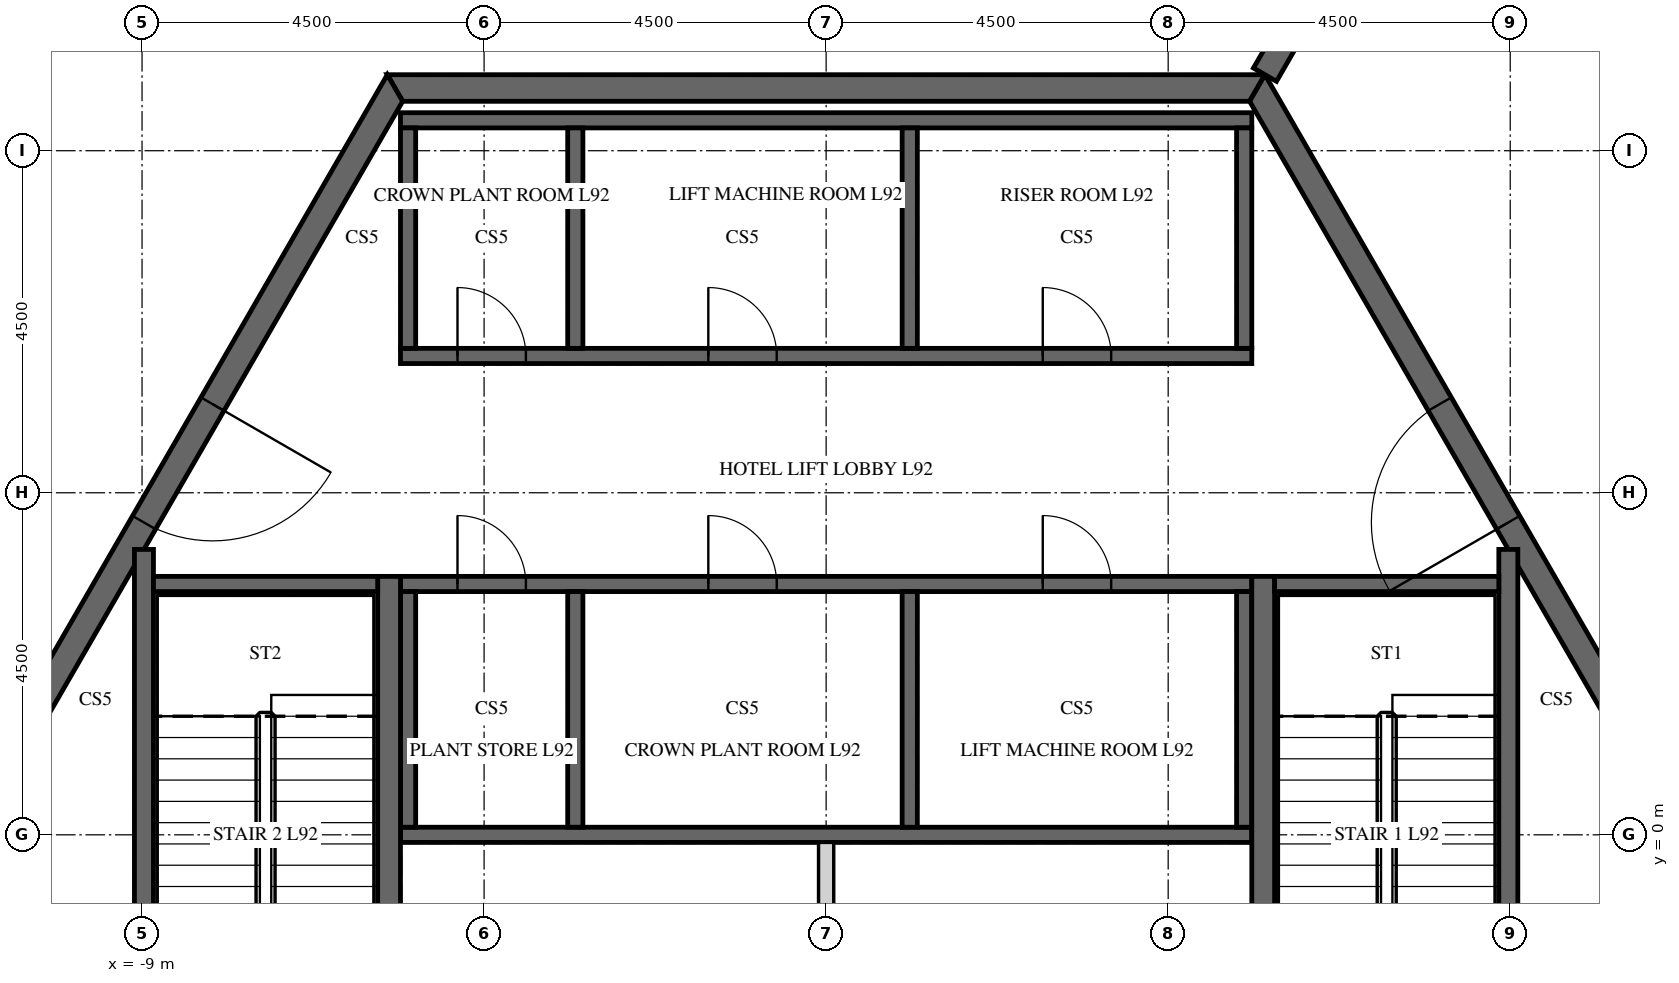
"""IFC4 building model, lengths in metres.
Left out: names, types, materials, properties, quantities, classifications, styles, units other than length and angle.
Written with IfcOpenShell. Run it as: python <this file> out.ifc"""

import sys

from ifc_helpers import new_model, si_unit, direction, frame, frame_2d, origin, place, context, subcontext, project, spatial, polyline, rectangle, outline, extrude, element, fill, save


model = new_model("IFC4")
c1 = context("Model", 3, precision=1e-05, world=origin(), true_north=direction((0.0, 1.0)))
c2 = subcontext(c1, "Body", "Model", "MODEL_VIEW")
j1 = project(units=[si_unit("LENGTHUNIT", "METRE"), si_unit("PLANEANGLEUNIT", "RADIAN")], contexts=[c1])
p1 = place(None, origin())
s1 = spatial("IfcSite", under=j1, at=p1, CompositionType="ELEMENT")
p2 = place(p1, origin())
s2 = spatial("IfcBuilding", under=s1, at=p2, CompositionType="ELEMENT")
p3 = place(p2, frame((0.0, 0.0, 388.2)))
s3 = spatial("IfcBuildingStorey", under=s2, at=p3, CompositionType="ELEMENT", Elevation=388.2)
p4 = place(p3, frame((-5.673, 9.825, -0.2), z_axis=(0.0, 0.0, 1.0), x_axis=(-0.499995046907, -0.866028263435, 0.0)))
e1 = element("IfcWall", 1, at=p4, inside=s3, PredefinedType="SHEAR", context=c2, shape_type="SweptSolid", body=[
    extrude(outline(polyline([(-0.101, -0.175), (11.446, -0.175), (11.244, 0.175), (0.101, 0.175), (-0.101, -0.175)])), origin(), (0.0, 0.0, 1.0), 4.5),
])
p5 = place(p4, frame((4.801, 0.0, 0.2)))
e2 = element("IfcOpeningElement", 2, at=p5, cuts=e1, PredefinedType="OPENING", context=c2, shape_type="SweptSolid", body=[
    extrude(rectangle(XDim=1.8, YDim=2.4, at=frame_2d((0.9, 1.2))), frame((0.0, 0.185, 0.0), z_axis=(0.0, -1.0, 0.0), x_axis=(1.0, 0.0, 0.0)), (0.0, 0.0, 1.0), 0.37),
])
p6 = place(p3, frame((-11.345, 0.0, -0.2), z_axis=(0.0, 0.0, 1.0), x_axis=(0.499995046907, -0.866028263435, 0.0)))
e3 = element("IfcWall", 3, at=p6, inside=s3, PredefinedType="SHEAR", context=c2, shape_type="SweptSolid", body=[
    extrude(outline(polyline([(-0.101, -0.175), (11.446, -0.175), (11.244, 0.175), (0.101, 0.175), (-0.101, -0.175)])), origin(), (0.0, 0.0, 1.0), 4.5),
])
p7 = place(p6, frame((4.744, 0.0, 0.2)))
e4 = element("IfcOpeningElement", 4, at=p7, cuts=e3, PredefinedType="OPENING", context=c2, shape_type="SweptSolid", body=[
    extrude(rectangle(XDim=1.8, YDim=2.4, at=frame_2d((0.9, 1.2))), frame((0.0, 0.185, 0.0), z_axis=(0.0, -1.0, 0.0), x_axis=(1.0, 0.0, 0.0)), (0.0, 0.0, 1.0), 0.37),
])
p8 = place(p3, frame((5.673, -9.825, -0.2), z_axis=(0.0, 0.0, 1.0), x_axis=(0.499995046907, 0.866028263435, 0.0)))
e5 = element("IfcWall", 5, at=p8, inside=s3, PredefinedType="SHEAR", context=c2, shape_type="SweptSolid", body=[
    extrude(outline(polyline([(-0.101, -0.175), (11.446, -0.175), (11.244, 0.175), (0.101, 0.175), (-0.101, -0.175)])), origin(), (0.0, 0.0, 1.0), 4.5),
])
p9 = place(p8, frame((4.801, 0.0, 0.2)))
e6 = element("IfcOpeningElement", 6, at=p9, cuts=e5, PredefinedType="OPENING", context=c2, shape_type="SweptSolid", body=[
    extrude(rectangle(XDim=1.8, YDim=2.4, at=frame_2d((0.9, 1.2))), frame((0.0, 0.185, 0.0), z_axis=(0.0, -1.0, 0.0), x_axis=(1.0, 0.0, 0.0)), (0.0, 0.0, 1.0), 0.37),
])
p10 = place(p3, frame((11.345, 0.0, -0.2), z_axis=(0.0, 0.0, 1.0), x_axis=(-0.499995046907, 0.866028263435, 0.0)))
e7 = element("IfcWall", 7, at=p10, inside=s3, PredefinedType="SHEAR", context=c2, shape_type="SweptSolid", body=[
    extrude(outline(polyline([(-0.101, -0.175), (11.446, -0.175), (11.244, 0.175), (0.101, 0.175), (-0.101, -0.175)])), origin(), (0.0, 0.0, 1.0), 4.5),
])
p11 = place(p10, frame((4.744, 0.0, 0.2)))
e8 = element("IfcOpeningElement", 8, at=p11, cuts=e7, PredefinedType="OPENING", context=c2, shape_type="SweptSolid", body=[
    extrude(rectangle(XDim=1.8, YDim=2.4, at=frame_2d((0.9, 1.2))), frame((0.0, 0.185, 0.0), z_axis=(0.0, -1.0, 0.0), x_axis=(1.0, 0.0, 0.0)), (0.0, 0.0, 1.0), 0.37),
])
p12 = place(p3, frame((5.673, 9.825, -0.2), z_axis=(0.0, 0.0, 1.0), x_axis=(-1.0, 0.0, 0.0)))
e9 = element("IfcWall", 9, at=p12, inside=s3, PredefinedType="SHEAR", context=c2, shape_type="SweptSolid", body=[
    extrude(outline(polyline([(-0.101, -0.175), (11.446, -0.175), (11.244, 0.175), (0.101, 0.175), (-0.101, -0.175)])), origin(), (0.0, 0.0, 1.0), 4.5),
])
p13 = place(p3, frame((5.773, 10.0, -0.2), z_axis=(0.0, 0.0, 1.0), x_axis=(0.50001273609, 0.866018050475, 0.0)))
e10 = element("IfcWall", 10, at=p13, inside=s3, PredefinedType="SHEAR", context=c2, shape_type="SweptSolid", body=[
    extrude(rectangle(XDim=12.425, YDim=0.35, at=frame_2d((6.212, 0.0))), origin(), (0.0, 0.0, 1.0), 4.5),
])
p14 = place(p13, frame((5.312, 0.0, 0.2)))
e11 = element("IfcOpeningElement", 11, at=p14, cuts=e10, PredefinedType="OPENING", context=c2, shape_type="SweptSolid", body=[
    extrude(rectangle(XDim=1.8, YDim=2.4, at=frame_2d((0.9, 1.2))), frame((0.0, 0.185, 0.0), z_axis=(0.0, -1.0, 0.0), x_axis=(1.0, 0.0, 0.0)), (0.0, 0.0, 1.0), 0.37),
])
p15 = place(p3, frame((-5.6, 6.3, -0.2), z_axis=(0.0, 0.0, 1.0), x_axis=(1.0, 0.0, 0.0)))
e12 = element("IfcWall", 12, at=p15, inside=s3, PredefinedType="SHEAR", context=c2, shape_type="SweptSolid", body=[
    extrude(rectangle(XDim=11.2, YDim=0.2, at=frame_2d((5.6, 0.0))), origin(), (0.0, 0.0, 1.0), 4.5),
])
p16 = place(p15, frame((0.75, 0.0, 0.2)))
e13 = element("IfcOpeningElement", 13, at=p16, cuts=e12, PredefinedType="OPENING", context=c2, shape_type="SweptSolid", body=[
    extrude(rectangle(XDim=0.9, YDim=2.1, at=frame_2d((0.45, 1.05))), frame((0.0, 0.11, 0.0), z_axis=(0.0, -1.0, 0.0), x_axis=(1.0, 0.0, 0.0)), (0.0, 0.0, 1.0), 0.22),
])
p17 = place(p15, frame((4.05, 0.0, 0.2)))
e14 = element("IfcOpeningElement", 14, at=p17, cuts=e12, PredefinedType="OPENING", context=c2, shape_type="SweptSolid", body=[
    extrude(rectangle(XDim=0.9, YDim=2.1, at=frame_2d((0.45, 1.05))), frame((0.0, 0.11, 0.0), z_axis=(0.0, -1.0, 0.0), x_axis=(1.0, 0.0, 0.0)), (0.0, 0.0, 1.0), 0.22),
])
p18 = place(p15, frame((8.45, 0.0, 0.2)))
e15 = element("IfcOpeningElement", 15, at=p18, cuts=e12, PredefinedType="OPENING", context=c2, shape_type="SweptSolid", body=[
    extrude(rectangle(XDim=0.9, YDim=2.1, at=frame_2d((0.45, 1.05))), frame((0.0, 0.11, 0.0), z_axis=(0.0, -1.0, 0.0), x_axis=(1.0, 0.0, 0.0)), (0.0, 0.0, 1.0), 0.22),
])
p19 = place(p3, frame((-5.6, 9.4, -0.2), z_axis=(0.0, 0.0, 1.0), x_axis=(1.0, 0.0, 0.0)))
e16 = element("IfcWall", 16, at=p19, inside=s3, PredefinedType="SHEAR", context=c2, shape_type="SweptSolid", body=[
    extrude(rectangle(XDim=11.2, YDim=0.2, at=frame_2d((5.6, 0.0))), origin(), (0.0, 0.0, 1.0), 4.5),
])
for number, where, z_axis, x_axis in (
    (17, (-5.5, 6.4, -0.2), (0.0, 0.0, 1.0), (0.0, 1.0, 0.0)),
    (18, (-3.3, 6.4, -0.2), (0.0, 0.0, 1.0), (0.0, 1.0, 0.0)),
    (19, (1.1, 6.4, -0.2), (0.0, 0.0, 1.0), (0.0, 1.0, 0.0)),
    (20, (5.5, 6.4, -0.2), (0.0, 0.0, 1.0), (0.0, 1.0, 0.0)),
):
    element("IfcWall", number, at=place(p3, frame(where, z_axis=z_axis, x_axis=x_axis)), inside=s3, PredefinedType="SHEAR", context=c2, shape_type="SweptSolid", body=[
        extrude(rectangle(XDim=2.9, YDim=0.2, at=frame_2d((1.45, 0.0))), origin(), (0.0, 0.0, 1.0), 4.5),
    ])
p20 = place(p3, frame((-5.6, 3.3, -0.2), z_axis=(0.0, 0.0, 1.0), x_axis=(1.0, 0.0, 0.0)))
e21 = element("IfcWall", 21, at=p20, inside=s3, PredefinedType="SHEAR", context=c2, shape_type="SweptSolid", body=[
    extrude(rectangle(XDim=11.2, YDim=0.2, at=frame_2d((5.6, 0.0))), origin(), (0.0, 0.0, 1.0), 4.5),
])
p21 = place(p20, frame((0.75, 0.0, 0.2)))
e22 = element("IfcOpeningElement", 22, at=p21, cuts=e21, PredefinedType="OPENING", context=c2, shape_type="SweptSolid", body=[
    extrude(rectangle(XDim=0.9, YDim=2.1, at=frame_2d((0.45, 1.05))), frame((0.0, 0.11, 0.0), z_axis=(0.0, -1.0, 0.0), x_axis=(1.0, 0.0, 0.0)), (0.0, 0.0, 1.0), 0.22),
])
p22 = place(p20, frame((4.05, 0.0, 0.2)))
e23 = element("IfcOpeningElement", 23, at=p22, cuts=e21, PredefinedType="OPENING", context=c2, shape_type="SweptSolid", body=[
    extrude(rectangle(XDim=0.9, YDim=2.1, at=frame_2d((0.45, 1.05))), frame((0.0, 0.11, 0.0), z_axis=(0.0, -1.0, 0.0), x_axis=(1.0, 0.0, 0.0)), (0.0, 0.0, 1.0), 0.22),
])
p23 = place(p20, frame((8.45, 0.0, 0.2)))
e24 = element("IfcOpeningElement", 24, at=p23, cuts=e21, PredefinedType="OPENING", context=c2, shape_type="SweptSolid", body=[
    extrude(rectangle(XDim=0.9, YDim=2.1, at=frame_2d((0.45, 1.05))), frame((0.0, 0.11, 0.0), z_axis=(0.0, -1.0, 0.0), x_axis=(1.0, 0.0, 0.0)), (0.0, 0.0, 1.0), 0.22),
])
p24 = place(p3, frame((-5.6, 0.0, -0.2), z_axis=(0.0, 0.0, 1.0), x_axis=(1.0, 0.0, 0.0)))
e25 = element("IfcWall", 25, at=p24, inside=s3, PredefinedType="SHEAR", context=c2, shape_type="SweptSolid", body=[
    extrude(rectangle(XDim=11.2, YDim=0.2, at=frame_2d((5.6, 0.0))), origin(), (0.0, 0.0, 1.0), 4.5),
])
for number, where, z_axis, x_axis in (
    (26, (-5.5, 0.1, -0.2), (0.0, 0.0, 1.0), (0.0, 1.0, 0.0)),
    (27, (-3.3, 0.1, -0.2), (0.0, 0.0, 1.0), (0.0, 1.0, 0.0)),
    (28, (1.1, 0.1, -0.2), (0.0, 0.0, 1.0), (0.0, 1.0, 0.0)),
    (29, (5.5, 0.1, -0.2), (0.0, 0.0, 1.0), (0.0, 1.0, 0.0)),
):
    element("IfcWall", number, at=place(p3, frame(where, z_axis=z_axis, x_axis=x_axis)), inside=s3, PredefinedType="SHEAR", context=c2, shape_type="SweptSolid", body=[
        extrude(rectangle(XDim=3.1, YDim=0.2, at=frame_2d((1.55, 0.0))), origin(), (0.0, 0.0, 1.0), 4.5),
    ])
p25 = place(p3, frame((0.0, -6.2, 0.0), z_axis=(0.0, 0.0, 1.0), x_axis=(0.0, 1.0, 0.0)))
e30 = element("IfcWall", 30, at=p25, inside=s3, PredefinedType="PARTITIONING", context=c2, shape_type="SweptSolid", body=[
    extrude(rectangle(XDim=6.1, YDim=0.2, at=frame_2d((3.05, 0.0))), origin(), (0.0, 0.0, 1.0), 4.3),
])
p26 = place(p3, frame((5.75, -3.4, -0.2), z_axis=(0.0, 0.0, 1.0), x_axis=(0.0, 1.0, 0.0)))
e31 = element("IfcWall", 31, at=p26, inside=s3, PredefinedType="SHEAR", context=c2, shape_type="SweptSolid", body=[
    extrude(rectangle(XDim=6.8, YDim=0.3, at=frame_2d((3.4, 0.0))), origin(), (0.0, 0.0, 1.0), 4.5),
])
p27 = place(p3, frame((8.975, -3.755, -0.2), z_axis=(0.0, 0.0, 1.0), x_axis=(0.0, 1.0, 0.0)))
e32 = element("IfcWall", 32, at=p27, inside=s3, PredefinedType="SHEAR", context=c2, shape_type="SweptSolid", body=[
    extrude(rectangle(XDim=7.51, YDim=0.25, at=frame_2d((3.755, 0.0))), origin(), (0.0, 0.0, 1.0), 4.5),
])
p28 = place(p3, frame((5.9, 3.3, -0.2), z_axis=(0.0, 0.0, 1.0), x_axis=(1.0, 0.0, 0.0)))
e33 = element("IfcWall", 33, at=p28, inside=s3, PredefinedType="SHEAR", context=c2, shape_type="SweptSolid", body=[
    extrude(rectangle(XDim=2.95, YDim=0.2, at=frame_2d((1.475, 0.0))), origin(), (0.0, 0.0, 1.0), 4.5),
])
p29 = place(p3, frame((-5.75, -3.4, -0.2), z_axis=(0.0, 0.0, 1.0), x_axis=(0.0, 1.0, 0.0)))
e34 = element("IfcWall", 34, at=p29, inside=s3, PredefinedType="SHEAR", context=c2, shape_type="SweptSolid", body=[
    extrude(rectangle(XDim=6.8, YDim=0.3, at=frame_2d((3.4, 0.0))), origin(), (0.0, 0.0, 1.0), 4.5),
])
p30 = place(p3, frame((-8.975, -3.755, -0.2), z_axis=(0.0, 0.0, 1.0), x_axis=(0.0, 1.0, 0.0)))
e35 = element("IfcWall", 35, at=p30, inside=s3, PredefinedType="SHEAR", context=c2, shape_type="SweptSolid", body=[
    extrude(rectangle(XDim=7.51, YDim=0.25, at=frame_2d((3.755, 0.0))), origin(), (0.0, 0.0, 1.0), 4.5),
])
p31 = place(p3, frame((-8.85, 3.3, -0.2), z_axis=(0.0, 0.0, 1.0), x_axis=(1.0, 0.0, 0.0)))
e36 = element("IfcWall", 36, at=p31, inside=s3, PredefinedType="SHEAR", context=c2, shape_type="SweptSolid", body=[
    extrude(rectangle(XDim=2.95, YDim=0.2, at=frame_2d((1.475, 0.0))), origin(), (0.0, 0.0, 1.0), 4.5),
])
p32 = place(p3, frame((-18.79, -0.175, 0.0), z_axis=(0.0, 0.0, 1.0), x_axis=(0.500020978615, -0.866013291437, 0.0)))
e37 = element("IfcWall", 37, at=p32, inside=s3, PredefinedType="PARTITIONING", context=c2, shape_type="SweptSolid", body=[
    extrude(rectangle(XDim=18.689, YDim=0.2, at=frame_2d((9.345, 0.0))), origin(), (0.0, 0.0, 1.0), 3.692),
])
p33 = place(p32, frame((8.745, 0.0, 0.0)))
e38 = element("IfcOpeningElement", 38, at=p33, cuts=e37, PredefinedType="OPENING", context=c2, shape_type="SweptSolid", body=[
    extrude(rectangle(XDim=1.2, YDim=2.1, at=frame_2d((0.6, 1.05))), frame((0.0, 0.11, 0.0), z_axis=(0.0, -1.0, 0.0), x_axis=(1.0, 0.0, 0.0)), (0.0, 0.0, 1.0), 0.22),
])
p34 = place(p3, frame((-9.445, 16.36, 0.0), z_axis=(0.0, 0.0, 1.0), x_axis=(-0.500020978615, -0.866013291437, 0.0)))
e39 = element("IfcWall", 39, at=p34, inside=s3, PredefinedType="PARTITIONING", context=c2, shape_type="SweptSolid", body=[
    extrude(rectangle(XDim=18.689, YDim=0.2, at=frame_2d((9.345, 0.0))), origin(), (0.0, 0.0, 1.0), 3.692),
])
p35 = place(p34, frame((8.745, 0.0, 0.0)))
e40 = element("IfcOpeningElement", 40, at=p35, cuts=e39, PredefinedType="OPENING", context=c2, shape_type="SweptSolid", body=[
    extrude(rectangle(XDim=1.2, YDim=2.1, at=frame_2d((0.6, 1.05))), frame((0.0, 0.11, 0.0), z_axis=(0.0, -1.0, 0.0), x_axis=(1.0, 0.0, 0.0)), (0.0, 0.0, 1.0), 0.22),
])
p36 = place(p3, frame((9.546, -16.185, 0.0), z_axis=(0.0, 0.0, 1.0), x_axis=(0.500030775662, 0.866007634718, 0.0)))
e41 = element("IfcWall", 41, at=p36, inside=s3, PredefinedType="PARTITIONING", context=c2, shape_type="SweptSolid", body=[
    extrude(rectangle(XDim=18.689, YDim=0.2, at=frame_2d((9.345, 0.0))), origin(), (0.0, 0.0, 1.0), 3.692),
])
p37 = place(p36, frame((8.745, 0.0, 0.0)))
e42 = element("IfcOpeningElement", 42, at=p37, cuts=e41, PredefinedType="OPENING", context=c2, shape_type="SweptSolid", body=[
    extrude(rectangle(XDim=1.2, YDim=2.1, at=frame_2d((0.6, 1.05))), frame((0.0, 0.11, 0.0), z_axis=(0.0, -1.0, 0.0), x_axis=(1.0, 0.0, 0.0)), (0.0, 0.0, 1.0), 0.22),
])
p38 = place(p3, frame((18.833, 0.1, 0.0), z_axis=(0.0, 0.0, 1.0), x_axis=(-0.500028143963, 0.86600915425, 0.0)))
e43 = element("IfcWall", 43, at=p38, inside=s3, PredefinedType="PARTITIONING", context=c2, shape_type="SweptSolid", body=[
    extrude(rectangle(XDim=18.574, YDim=0.2, at=frame_2d((9.287, 0.0))), origin(), (0.0, 0.0, 1.0), 3.692),
])
p39 = place(p5, origin())
e44 = element("IfcDoor", 44, at=p39, inside=s3, OperationType="DOUBLE_DOOR_SINGLE_SWING", PredefinedType="DOOR", context=c2, shape_type="SweptSolid", body=[
    extrude(rectangle(XDim=1.8, YDim=2.4, at=frame_2d((0.9, 1.2))), frame((0.0, 0.025, 0.0), z_axis=(0.0, -1.0, 0.0), x_axis=(1.0, 0.0, 0.0)), (0.0, 0.0, 1.0), 0.05),
])
fill(e2, e44)
p40 = place(p11, origin())
e45 = element("IfcDoor", 45, at=p40, inside=s3, OperationType="DOUBLE_DOOR_SINGLE_SWING", PredefinedType="DOOR", context=c2, shape_type="SweptSolid", body=[
    extrude(rectangle(XDim=1.8, YDim=2.4, at=frame_2d((0.9, 1.2))), frame((0.0, 0.025, 0.0), z_axis=(0.0, -1.0, 0.0), x_axis=(1.0, 0.0, 0.0)), (0.0, 0.0, 1.0), 0.05),
])
fill(e8, e45)
p41 = place(p16, origin())
e46 = element("IfcDoor", 46, at=p41, inside=s3, OperationType="SINGLE_SWING_LEFT", PredefinedType="DOOR", context=c2, shape_type="SweptSolid", body=[
    extrude(rectangle(XDim=0.9, YDim=2.1, at=frame_2d((0.45, 1.05))), frame((0.0, 0.025, 0.0), z_axis=(0.0, -1.0, 0.0), x_axis=(1.0, 0.0, 0.0)), (0.0, 0.0, 1.0), 0.05),
])
fill(e13, e46)
p42 = place(p17, origin())
e47 = element("IfcDoor", 47, at=p42, inside=s3, OperationType="SINGLE_SWING_LEFT", PredefinedType="DOOR", context=c2, shape_type="SweptSolid", body=[
    extrude(rectangle(XDim=0.9, YDim=2.1, at=frame_2d((0.45, 1.05))), frame((0.0, 0.025, 0.0), z_axis=(0.0, -1.0, 0.0), x_axis=(1.0, 0.0, 0.0)), (0.0, 0.0, 1.0), 0.05),
])
fill(e14, e47)
p43 = place(p18, origin())
e48 = element("IfcDoor", 48, at=p43, inside=s3, OperationType="SINGLE_SWING_LEFT", PredefinedType="DOOR", context=c2, shape_type="SweptSolid", body=[
    extrude(rectangle(XDim=0.9, YDim=2.1, at=frame_2d((0.45, 1.05))), frame((0.0, 0.025, 0.0), z_axis=(0.0, -1.0, 0.0), x_axis=(1.0, 0.0, 0.0)), (0.0, 0.0, 1.0), 0.05),
])
fill(e15, e48)
p44 = place(p21, origin())
e49 = element("IfcDoor", 49, at=p44, inside=s3, OperationType="SINGLE_SWING_LEFT", PredefinedType="DOOR", context=c2, shape_type="SweptSolid", body=[
    extrude(rectangle(XDim=0.9, YDim=2.1, at=frame_2d((0.45, 1.05))), frame((0.0, 0.025, 0.0), z_axis=(0.0, -1.0, 0.0), x_axis=(1.0, 0.0, 0.0)), (0.0, 0.0, 1.0), 0.05),
])
fill(e22, e49)
p45 = place(p22, origin())
e50 = element("IfcDoor", 50, at=p45, inside=s3, OperationType="SINGLE_SWING_LEFT", PredefinedType="DOOR", context=c2, shape_type="SweptSolid", body=[
    extrude(rectangle(XDim=0.9, YDim=2.1, at=frame_2d((0.45, 1.05))), frame((0.0, 0.025, 0.0), z_axis=(0.0, -1.0, 0.0), x_axis=(1.0, 0.0, 0.0)), (0.0, 0.0, 1.0), 0.05),
])
fill(e23, e50)
p46 = place(p23, origin())
e51 = element("IfcDoor", 51, at=p46, inside=s3, OperationType="SINGLE_SWING_LEFT", PredefinedType="DOOR", context=c2, shape_type="SweptSolid", body=[
    extrude(rectangle(XDim=0.9, YDim=2.1, at=frame_2d((0.45, 1.05))), frame((0.0, 0.025, 0.0), z_axis=(0.0, -1.0, 0.0), x_axis=(1.0, 0.0, 0.0)), (0.0, 0.0, 1.0), 0.05),
])
fill(e24, e51)
save(model, sys.argv[1])
